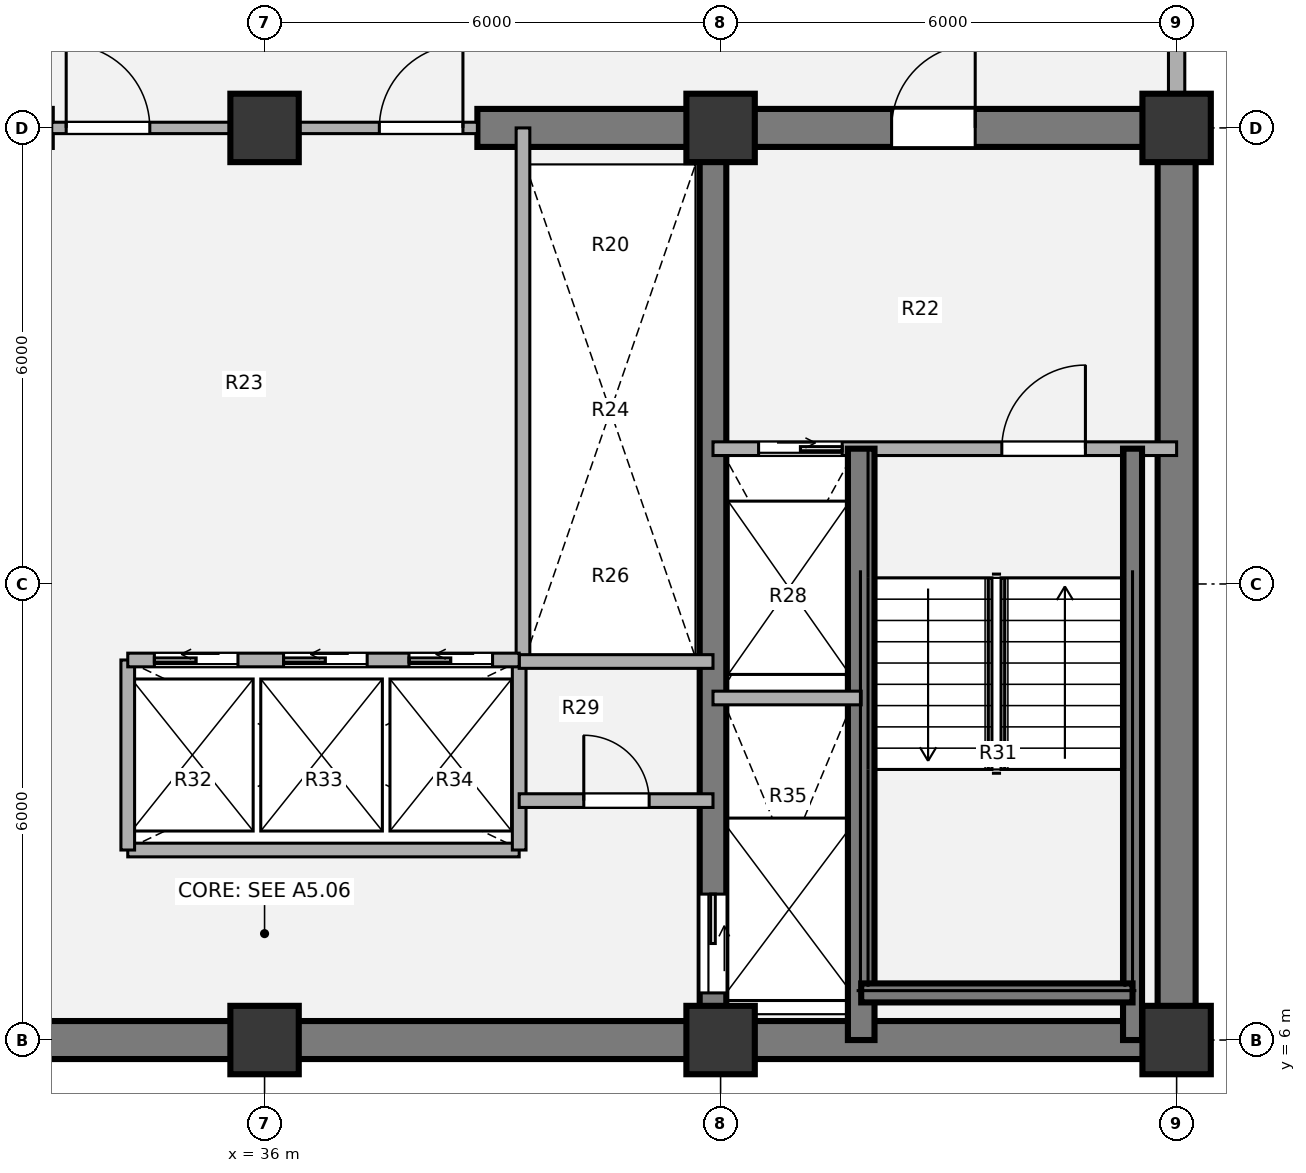
"""IFC4 building model, lengths in metres.
Left out: names, types, materials, properties, quantities, classifications, styles, units other than length and angle.
Written with IfcOpenShell. Run it as: python <this file> out.ifc"""

import sys

from ifc_helpers import new_model, si_unit, direction, frame, frame_2d, origin, origin_2d, place, context, subcontext, project, spatial, rectangle, extrude, source, transform, mapped, element, fill, save


model = new_model("IFC4")
c1 = context("Model", 3, precision=1e-05, world=origin(), true_north=direction((0.0, 1.0)))
c2 = subcontext(c1, "Body", "Model", "MODEL_VIEW")
j1 = project(units=[si_unit("LENGTHUNIT", "METRE"), si_unit("PLANEANGLEUNIT", "RADIAN")], contexts=[c1])
p1 = place(None, origin())
s1 = spatial("IfcSite", under=j1, at=p1, CompositionType="ELEMENT")
p2 = place(p1, origin())
s2 = spatial("IfcBuilding", under=s1, at=p2, CompositionType="ELEMENT")
p3 = place(p2, frame((0.0, 0.0, 142.74)))
s3 = spatial("IfcBuildingStorey", under=s2, at=p3, CompositionType="ELEMENT", Elevation=142.74)
m1 = source(origin(), c2, "Body", "SweptSolid", [
    extrude(rectangle(XDim=0.9, YDim=0.9, at=origin_2d()), origin(), (0.0, 0.0, 1.0), 3.78),
])
for number, where, z_axis, x_axis in (
    (1, (36.0, 6.0, 0.0), (0.0, 0.0, 1.0), (1.0, 0.0, 0.0)),
    (2, (42.0, 6.0, 0.0), (0.0, 0.0, 1.0), (1.0, 0.0, 0.0)),
    (3, (48.0, 6.0, 0.0), (0.0, 0.0, 1.0), (1.0, 0.0, 0.0)),
    (4, (36.0, 18.0, 0.0), (0.0, 0.0, 1.0), (1.0, 0.0, 0.0)),
    (5, (42.0, 18.0, 0.0), (0.0, 0.0, 1.0), (1.0, 0.0, 0.0)),
    (6, (48.0, 18.0, 0.0), (0.0, 0.0, 1.0), (1.0, 0.0, 0.0)),
):
    element("IfcColumn", number, at=place(p3, frame(where, z_axis=z_axis, x_axis=x_axis)), inside=s3, PredefinedType="COLUMN", context=c2, shape_type="MappedRepresentation", body=[
        mapped(m1, transform((0.0, 0.0, 0.0), x_axis=(1.0, 0.0, 0.0), y_axis=(0.0, 1.0, 0.0), z_axis=(0.0, 0.0, 1.0), scale=1.0)),
    ])
p4 = place(p3, frame((48.25, 6.0, 0.0), z_axis=(0.0, 0.0, 1.0), x_axis=(-1.0, 0.0, 0.0)))
e7 = element("IfcWall", 7, at=p4, inside=s3, PredefinedType="SHEAR", context=c2, shape_type="SweptSolid", body=[
    extrude(rectangle(XDim=24.5, YDim=0.5, at=frame_2d((12.25, 0.0))), origin(), (0.0, 0.0, 1.0), 3.78),
])
p5 = place(p3, frame((48.0, 18.0, 0.0), z_axis=(0.0, 0.0, 1.0), x_axis=(0.0, -1.0, 0.0)))
e8 = element("IfcWall", 8, at=p5, inside=s3, PredefinedType="SHEAR", context=c2, shape_type="SweptSolid", body=[
    extrude(rectangle(XDim=12.0, YDim=0.5, at=frame_2d((6.0, 0.0))), origin(), (0.0, 0.0, 1.0), 3.78),
])
p6 = place(p3, frame((23.75, 18.0, 0.0), z_axis=(0.0, 0.0, 1.0), x_axis=(1.0, 0.0, 0.0)))
e9 = element("IfcWall", 9, at=p6, inside=s3, PredefinedType="SHEAR", context=c2, shape_type="SweptSolid", body=[
    extrude(rectangle(XDim=9.45, YDim=0.5, at=frame_2d((4.725, 0.0))), origin(), (0.0, 0.0, 1.0), 3.78),
])
p7 = place(p6, frame((2.95, 0.0, 0.0)))
e10 = element("IfcOpeningElement", 10, at=p7, cuts=e9, PredefinedType="OPENING", context=c2, shape_type="SweptSolid", body=[
    extrude(rectangle(XDim=1.1, YDim=2.1, at=origin_2d()), frame((0.55, 0.26, 1.05), z_axis=(0.0, -1.0, 0.0), x_axis=(1.0, 0.0, 0.0)), (0.0, 0.0, 1.0), 0.52),
])
p8 = place(p3, frame((38.8, 18.0, 0.0), z_axis=(0.0, 0.0, 1.0), x_axis=(1.0, 0.0, 0.0)))
e11 = element("IfcWall", 11, at=p8, inside=s3, PredefinedType="SHEAR", context=c2, shape_type="SweptSolid", body=[
    extrude(rectangle(XDim=9.45, YDim=0.5, at=frame_2d((4.725, 0.0))), origin(), (0.0, 0.0, 1.0), 3.78),
])
p9 = place(p8, frame((5.45, 0.0, 0.0)))
e12 = element("IfcOpeningElement", 12, at=p9, cuts=e11, PredefinedType="OPENING", context=c2, shape_type="SweptSolid", body=[
    extrude(rectangle(XDim=1.1, YDim=2.1, at=origin_2d()), frame((0.55, 0.26, 1.05), z_axis=(0.0, -1.0, 0.0), x_axis=(1.0, 0.0, 0.0)), (0.0, 0.0, 1.0), 0.52),
])
p10 = place(p3, frame((41.9, 18.0, 0.0), z_axis=(0.0, 0.0, 1.0), x_axis=(0.0, -1.0, 0.0)))
e13 = element("IfcWall", 13, at=p10, inside=s3, PredefinedType="SHEAR", context=c2, shape_type="SweptSolid", body=[
    extrude(rectangle(XDim=12.0, YDim=0.35, at=frame_2d((6.0, 0.0))), origin(), (0.0, 0.0, 1.0), 3.78),
])
p11 = place(p10, frame((10.08, 0.0, 0.0)))
e14 = element("IfcOpeningElement", 14, at=p11, cuts=e13, PredefinedType="OPENING", context=c2, shape_type="SweptSolid", body=[
    extrude(rectangle(XDim=1.3, YDim=2.1, at=origin_2d()), frame((0.65, 0.185, 1.05), z_axis=(0.0, -1.0, 0.0), x_axis=(1.0, 0.0, 0.0)), (0.0, 0.0, 1.0), 0.37),
])
p12 = place(p3, frame((48.0, 21.05, 0.0), z_axis=(0.0, 0.0, 1.0), x_axis=(0.0, -1.0, 0.0)))
e15 = element("IfcWall", 15, at=p12, inside=s3, PredefinedType="SOLIDWALL", context=c2, shape_type="SweptSolid", body=[
    extrude(rectangle(XDim=2.62, YDim=0.215, at=frame_2d((1.31, 0.0))), origin(), (0.0, 0.0, 1.0), 3.372),
])
p13 = place(p3, frame((34.2, 8.5, 0.0), z_axis=(0.0, 0.0, 1.0), x_axis=(1.0, 0.0, 0.0)))
e16 = element("IfcWall", 16, at=p13, inside=s3, PredefinedType="PARTITIONING", context=c2, shape_type="SweptSolid", body=[
    extrude(rectangle(XDim=5.15, YDim=0.18, at=frame_2d((2.575, 0.0))), origin(), (0.0, 0.0, 1.0), 3.342),
])
for number, where, z_axis, x_axis in (
    (17, (34.2, 8.5, 0.0), (0.0, 0.0, 1.0), (0.0, 1.0, 0.0)),
    (18, (39.35, 8.5, 0.0), (0.0, 0.0, 1.0), (0.0, 1.0, 0.0)),
):
    element("IfcWall", number, at=place(p3, frame(where, z_axis=z_axis, x_axis=x_axis)), inside=s3, PredefinedType="PARTITIONING", context=c2, shape_type="SweptSolid", body=[
        extrude(rectangle(XDim=2.5, YDim=0.18, at=frame_2d((1.25, 0.0))), origin(), (0.0, 0.0, 1.0), 3.342),
    ])
p14 = place(p3, frame((39.4, 11.0, 0.0), z_axis=(0.0, 0.0, 1.0), x_axis=(0.0, 1.0, 0.0)))
e19 = element("IfcWall", 19, at=p14, inside=s3, PredefinedType="PARTITIONING", context=c2, shape_type="SweptSolid", body=[
    extrude(rectangle(XDim=7.0, YDim=0.18, at=frame_2d((3.5, 0.0))), origin(), (0.0, 0.0, 1.0), 3.342),
])
p15 = place(p3, frame((39.35, 10.98, 0.0), z_axis=(0.0, 0.0, 1.0), x_axis=(1.0, 0.0, 0.0)))
e20 = element("IfcWall", 20, at=p15, inside=s3, PredefinedType="PARTITIONING", context=c2, shape_type="SweptSolid", body=[
    extrude(rectangle(XDim=2.55, YDim=0.18, at=frame_2d((1.275, 0.0))), origin(), (0.0, 0.0, 1.0), 3.342),
])
p16 = place(p3, frame((39.35, 9.15, 0.0), z_axis=(0.0, 0.0, 1.0), x_axis=(1.0, 0.0, 0.0)))
e21 = element("IfcWall", 21, at=p16, inside=s3, PredefinedType="PARTITIONING", context=c2, shape_type="SweptSolid", body=[
    extrude(rectangle(XDim=2.55, YDim=0.18, at=frame_2d((1.275, 0.0))), origin(), (0.0, 0.0, 1.0), 3.342),
])
p17 = place(p16, frame((0.85, 0.0, 0.0)))
e22 = element("IfcOpeningElement", 22, at=p17, cuts=e21, PredefinedType="OPENING", context=c2, shape_type="SweptSolid", body=[
    extrude(rectangle(XDim=0.86, YDim=2.1, at=origin_2d()), frame((0.43, 0.1, 1.05), z_axis=(0.0, -1.0, 0.0), x_axis=(1.0, 0.0, 0.0)), (0.0, 0.0, 1.0), 0.2),
])
p18 = place(p3, frame((33.2, 18.0, 0.0), z_axis=(0.0, 0.0, 1.0), x_axis=(1.0, 0.0, 0.0)))
e23 = element("IfcWall", 23, at=p18, inside=s3, PredefinedType="PARTITIONING", context=c2, shape_type="SweptSolid", body=[
    extrude(rectangle(XDim=5.6, YDim=0.15, at=frame_2d((2.8, 0.0))), origin(), (0.0, 0.0, 1.0), 2.157),
])
p19 = place(p18, frame((0.19, 0.0, 0.0)))
e24 = element("IfcOpeningElement", 24, at=p19, cuts=e23, PredefinedType="OPENING", context=c2, shape_type="SweptSolid", body=[
    extrude(rectangle(XDim=1.1, YDim=2.097, at=origin_2d()), frame((0.55, 0.085, 1.048), z_axis=(0.0, -1.0, 0.0), x_axis=(1.0, 0.0, 0.0)), (0.0, 0.0, 1.0), 0.17),
])
p20 = place(p18, frame((4.31, 0.0, 0.0)))
e25 = element("IfcOpeningElement", 25, at=p20, cuts=e23, PredefinedType="OPENING", context=c2, shape_type="SweptSolid", body=[
    extrude(rectangle(XDim=1.1, YDim=2.097, at=origin_2d()), frame((0.55, 0.085, 1.048), z_axis=(0.0, -1.0, 0.0), x_axis=(1.0, 0.0, 0.0)), (0.0, 0.0, 1.0), 0.17),
])
p21 = place(p3, frame((41.9, 13.78, 0.0), z_axis=(0.0, 0.0, 1.0), x_axis=(1.0, 0.0, 0.0)))
e26 = element("IfcWall", 26, at=p21, inside=s3, PredefinedType="PARTITIONING", context=c2, shape_type="SweptSolid", body=[
    extrude(rectangle(XDim=6.1, YDim=0.18, at=frame_2d((3.05, 0.0))), origin(), (0.0, 0.0, 1.0), 3.342),
])
p22 = place(p21, frame((0.6, 0.0, 0.0)))
e27 = element("IfcOpeningElement", 27, at=p22, cuts=e26, PredefinedType="OPENING", context=c2, shape_type="SweptSolid", body=[
    extrude(rectangle(XDim=1.1, YDim=2.1, at=origin_2d()), frame((0.55, 0.1, 1.05), z_axis=(0.0, -1.0, 0.0), x_axis=(1.0, 0.0, 0.0)), (0.0, 0.0, 1.0), 0.2),
])
p23 = place(p21, frame((3.8, 0.0, 0.0)))
e28 = element("IfcOpeningElement", 28, at=p23, cuts=e26, PredefinedType="OPENING", context=c2, shape_type="SweptSolid", body=[
    extrude(rectangle(XDim=1.1, YDim=2.1, at=origin_2d()), frame((0.55, 0.1, 1.05), z_axis=(0.0, -1.0, 0.0), x_axis=(1.0, 0.0, 0.0)), (0.0, 0.0, 1.0), 0.2),
])
p24 = place(p3, frame((43.85, 6.0, 0.0), z_axis=(0.0, 0.0, 1.0), x_axis=(0.0, 1.0, 0.0)))
e29 = element("IfcWall", 29, at=p24, inside=s3, PredefinedType="SHEAR", context=c2, shape_type="SweptSolid", body=[
    extrude(rectangle(XDim=7.78, YDim=0.35, at=frame_2d((3.89, 0.0))), origin(), (0.0, 0.0, 1.0), 3.692),
])
p25 = place(p3, frame((47.42, 6.0, 0.0), z_axis=(0.0, 0.0, 1.0), x_axis=(0.0, 1.0, 0.0)))
e30 = element("IfcWall", 30, at=p25, inside=s3, PredefinedType="SHEAR", context=c2, shape_type="SweptSolid", body=[
    extrude(rectangle(XDim=7.78, YDim=0.25, at=frame_2d((3.89, 0.0))), origin(), (0.0, 0.0, 1.0), 3.692),
])
p26 = place(p3, frame((43.85, 6.62, 0.0), z_axis=(0.0, 0.0, 1.0), x_axis=(1.0, 0.0, 0.0)))
e31 = element("IfcWall", 31, at=p26, inside=s3, PredefinedType="SHEAR", context=c2, shape_type="SweptSolid", body=[
    extrude(rectangle(XDim=3.57, YDim=0.25, at=frame_2d((1.785, 0.0))), origin(), (0.0, 0.0, 1.0), 3.692),
])
p27 = place(p3, frame((41.9, 10.5, 0.0), z_axis=(0.0, 0.0, 1.0), x_axis=(1.0, 0.0, 0.0)))
e32 = element("IfcWall", 32, at=p27, inside=s3, PredefinedType="PARTITIONING", context=c2, shape_type="SweptSolid", body=[
    extrude(rectangle(XDim=1.95, YDim=0.18, at=frame_2d((0.975, 0.0))), origin(), (0.0, 0.0, 1.0), 3.342),
])
p28 = place(p3, frame((34.2, 11.0, 0.0), z_axis=(0.0, 0.0, 1.0), x_axis=(1.0, 0.0, 0.0)))
e33 = element("IfcWall", 33, at=p28, inside=s3, PredefinedType="PARTITIONING", context=c2, shape_type="SweptSolid", body=[
    extrude(rectangle(XDim=5.15, YDim=0.18, at=frame_2d((2.575, 0.0))), origin(), (0.0, 0.0, 1.0), 3.342),
])
p29 = place(p28, frame((0.35, 0.0, 0.0)))
e34 = element("IfcOpeningElement", 34, at=p29, cuts=e33, PredefinedType="OPENING", context=c2, shape_type="SweptSolid", body=[
    extrude(rectangle(XDim=1.1, YDim=2.1, at=origin_2d()), frame((0.55, 0.1, 1.05), z_axis=(0.0, -1.0, 0.0), x_axis=(1.0, 0.0, 0.0)), (0.0, 0.0, 1.0), 0.2),
])
p30 = place(p28, frame((2.05, 0.0, 0.0)))
e35 = element("IfcOpeningElement", 35, at=p30, cuts=e33, PredefinedType="OPENING", context=c2, shape_type="SweptSolid", body=[
    extrude(rectangle(XDim=1.1, YDim=2.1, at=origin_2d()), frame((0.55, 0.1, 1.05), z_axis=(0.0, -1.0, 0.0), x_axis=(1.0, 0.0, 0.0)), (0.0, 0.0, 1.0), 0.2),
])
p31 = place(p28, frame((3.7, 0.0, 0.0)))
e36 = element("IfcOpeningElement", 36, at=p31, cuts=e33, PredefinedType="OPENING", context=c2, shape_type="SweptSolid", body=[
    extrude(rectangle(XDim=1.1, YDim=2.1, at=origin_2d()), frame((0.55, 0.1, 1.05), z_axis=(0.0, -1.0, 0.0), x_axis=(1.0, 0.0, 0.0)), (0.0, 0.0, 1.0), 0.2),
])
m2 = source(origin(), c2, "Body", "SweptSolid", [
    extrude(rectangle(XDim=0.86, YDim=2.1, at=origin_2d()), frame((0.43, 0.025, 1.05), z_axis=(0.0, -1.0, 0.0), x_axis=(1.0, 0.0, 0.0)), (0.0, 0.0, 1.0), 0.05),
])
p32 = place(p17, origin())
e37 = element("IfcDoor", 37, at=p32, inside=s3, OperationType="SINGLE_SWING_LEFT", PredefinedType="DOOR", context=c2, shape_type="MappedRepresentation", body=[
    mapped(m2, transform((0.0, 0.0, 0.0), x_axis=(1.0, 0.0, 0.0), y_axis=(0.0, 1.0, 0.0), z_axis=(0.0, 0.0, 1.0), scale=1.0)),
])
fill(e22, e37)
m3 = source(origin(), c2, "Body", "SweptSolid", [
    extrude(rectangle(XDim=1.1, YDim=2.097, at=origin_2d()), frame((0.55, 0.025, 1.048), z_axis=(0.0, -1.0, 0.0), x_axis=(1.0, 0.0, 0.0)), (0.0, 0.0, 1.0), 0.05),
])
p33 = place(p19, origin())
e38 = element("IfcDoor", 38, at=p33, inside=s3, OperationType="SINGLE_SWING_LEFT", PredefinedType="DOOR", context=c2, shape_type="MappedRepresentation", body=[
    mapped(m3, transform((0.0, 0.0, 0.0), x_axis=(1.0, 0.0, 0.0), y_axis=(0.0, 1.0, 0.0), z_axis=(0.0, 0.0, 1.0), scale=1.0)),
])
fill(e24, e38)
p34 = place(p20, origin())
e39 = element("IfcDoor", 39, at=p34, inside=s3, OperationType="SINGLE_SWING_RIGHT", PredefinedType="DOOR", context=c2, shape_type="MappedRepresentation", body=[
    mapped(m3, transform((0.0, 0.0, 0.0), x_axis=(1.0, 0.0, 0.0), y_axis=(0.0, 1.0, 0.0), z_axis=(0.0, 0.0, 1.0), scale=1.0)),
])
fill(e25, e39)
m4 = source(origin(), c2, "Body", "SweptSolid", [
    extrude(rectangle(XDim=1.1, YDim=2.1, at=origin_2d()), frame((0.55, 0.025, 1.05), z_axis=(0.0, -1.0, 0.0), x_axis=(1.0, 0.0, 0.0)), (0.0, 0.0, 1.0), 0.05),
])
p35 = place(p22, origin())
e40 = element("IfcDoor", 40, at=p35, inside=s3, OperationType="SLIDING_TO_RIGHT", PredefinedType="DOOR", context=c2, shape_type="MappedRepresentation", body=[
    mapped(m4, transform((0.0, 0.0, 0.0), x_axis=(1.0, 0.0, 0.0), y_axis=(0.0, 1.0, 0.0), z_axis=(0.0, 0.0, 1.0), scale=1.0)),
])
fill(e27, e40)
m5 = source(origin(), c2, "Body", "SweptSolid", [
    extrude(rectangle(XDim=1.1, YDim=2.1, at=origin_2d()), frame((0.55, 0.025, 1.05), z_axis=(0.0, -1.0, 0.0), x_axis=(1.0, 0.0, 0.0)), (0.0, 0.0, 1.0), 0.05),
])
p36 = place(p23, origin())
e41 = element("IfcDoor", 41, at=p36, inside=s3, OperationType="SINGLE_SWING_RIGHT", PredefinedType="DOOR", context=c2, shape_type="MappedRepresentation", body=[
    mapped(m5, transform((0.0, 0.0, 0.0), x_axis=(1.0, 0.0, 0.0), y_axis=(0.0, 1.0, 0.0), z_axis=(0.0, 0.0, 1.0), scale=1.0)),
])
fill(e28, e41)
m6 = source(origin(), c2, "Body", "SweptSolid", [
    extrude(rectangle(XDim=1.3, YDim=2.1, at=origin_2d()), frame((0.65, 0.025, 1.05), z_axis=(0.0, -1.0, 0.0), x_axis=(1.0, 0.0, 0.0)), (0.0, 0.0, 1.0), 0.05),
])
p37 = place(p11, origin())
e42 = element("IfcDoor", 42, at=p37, inside=s3, OperationType="SLIDING_TO_LEFT", PredefinedType="DOOR", context=c2, shape_type="MappedRepresentation", body=[
    mapped(m6, transform((0.0, 0.0, 0.0), x_axis=(1.0, 0.0, 0.0), y_axis=(0.0, 1.0, 0.0), z_axis=(0.0, 0.0, 1.0), scale=1.0)),
])
fill(e14, e42)
m7 = source(origin(), c2, "Body", "SweptSolid", [
    extrude(rectangle(XDim=1.1, YDim=2.1, at=origin_2d()), frame((0.55, 0.025, 1.05), z_axis=(0.0, -1.0, 0.0), x_axis=(1.0, 0.0, 0.0)), (0.0, 0.0, 1.0), 0.05),
])
p38 = place(p9, origin())
e43 = element("IfcDoor", 43, at=p38, inside=s3, OperationType="SINGLE_SWING_RIGHT", PredefinedType="DOOR", context=c2, shape_type="MappedRepresentation", body=[
    mapped(m7, transform((0.0, 0.0, 0.0), x_axis=(1.0, 0.0, 0.0), y_axis=(0.0, 1.0, 0.0), z_axis=(0.0, 0.0, 1.0), scale=1.0)),
])
fill(e12, e43)
p39 = place(p29, origin())
e44 = element("IfcDoor", 44, at=p39, inside=s3, OperationType="SLIDING_TO_LEFT", PredefinedType="DOOR", context=c2, shape_type="MappedRepresentation", body=[
    mapped(m4, transform((0.0, 0.0, 0.0), x_axis=(1.0, 0.0, 0.0), y_axis=(0.0, 1.0, 0.0), z_axis=(0.0, 0.0, 1.0), scale=1.0)),
])
fill(e34, e44)
p40 = place(p30, origin())
e45 = element("IfcDoor", 45, at=p40, inside=s3, OperationType="SLIDING_TO_LEFT", PredefinedType="DOOR", context=c2, shape_type="MappedRepresentation", body=[
    mapped(m4, transform((0.0, 0.0, 0.0), x_axis=(1.0, 0.0, 0.0), y_axis=(0.0, 1.0, 0.0), z_axis=(0.0, 0.0, 1.0), scale=1.0)),
])
fill(e35, e45)
p41 = place(p31, origin())
e46 = element("IfcDoor", 46, at=p41, inside=s3, OperationType="SLIDING_TO_LEFT", PredefinedType="DOOR", context=c2, shape_type="MappedRepresentation", body=[
    mapped(m4, transform((0.0, 0.0, 0.0), x_axis=(1.0, 0.0, 0.0), y_axis=(0.0, 1.0, 0.0), z_axis=(0.0, 0.0, 1.0), scale=1.0)),
])
fill(e36, e46)
save(model, sys.argv[1])
